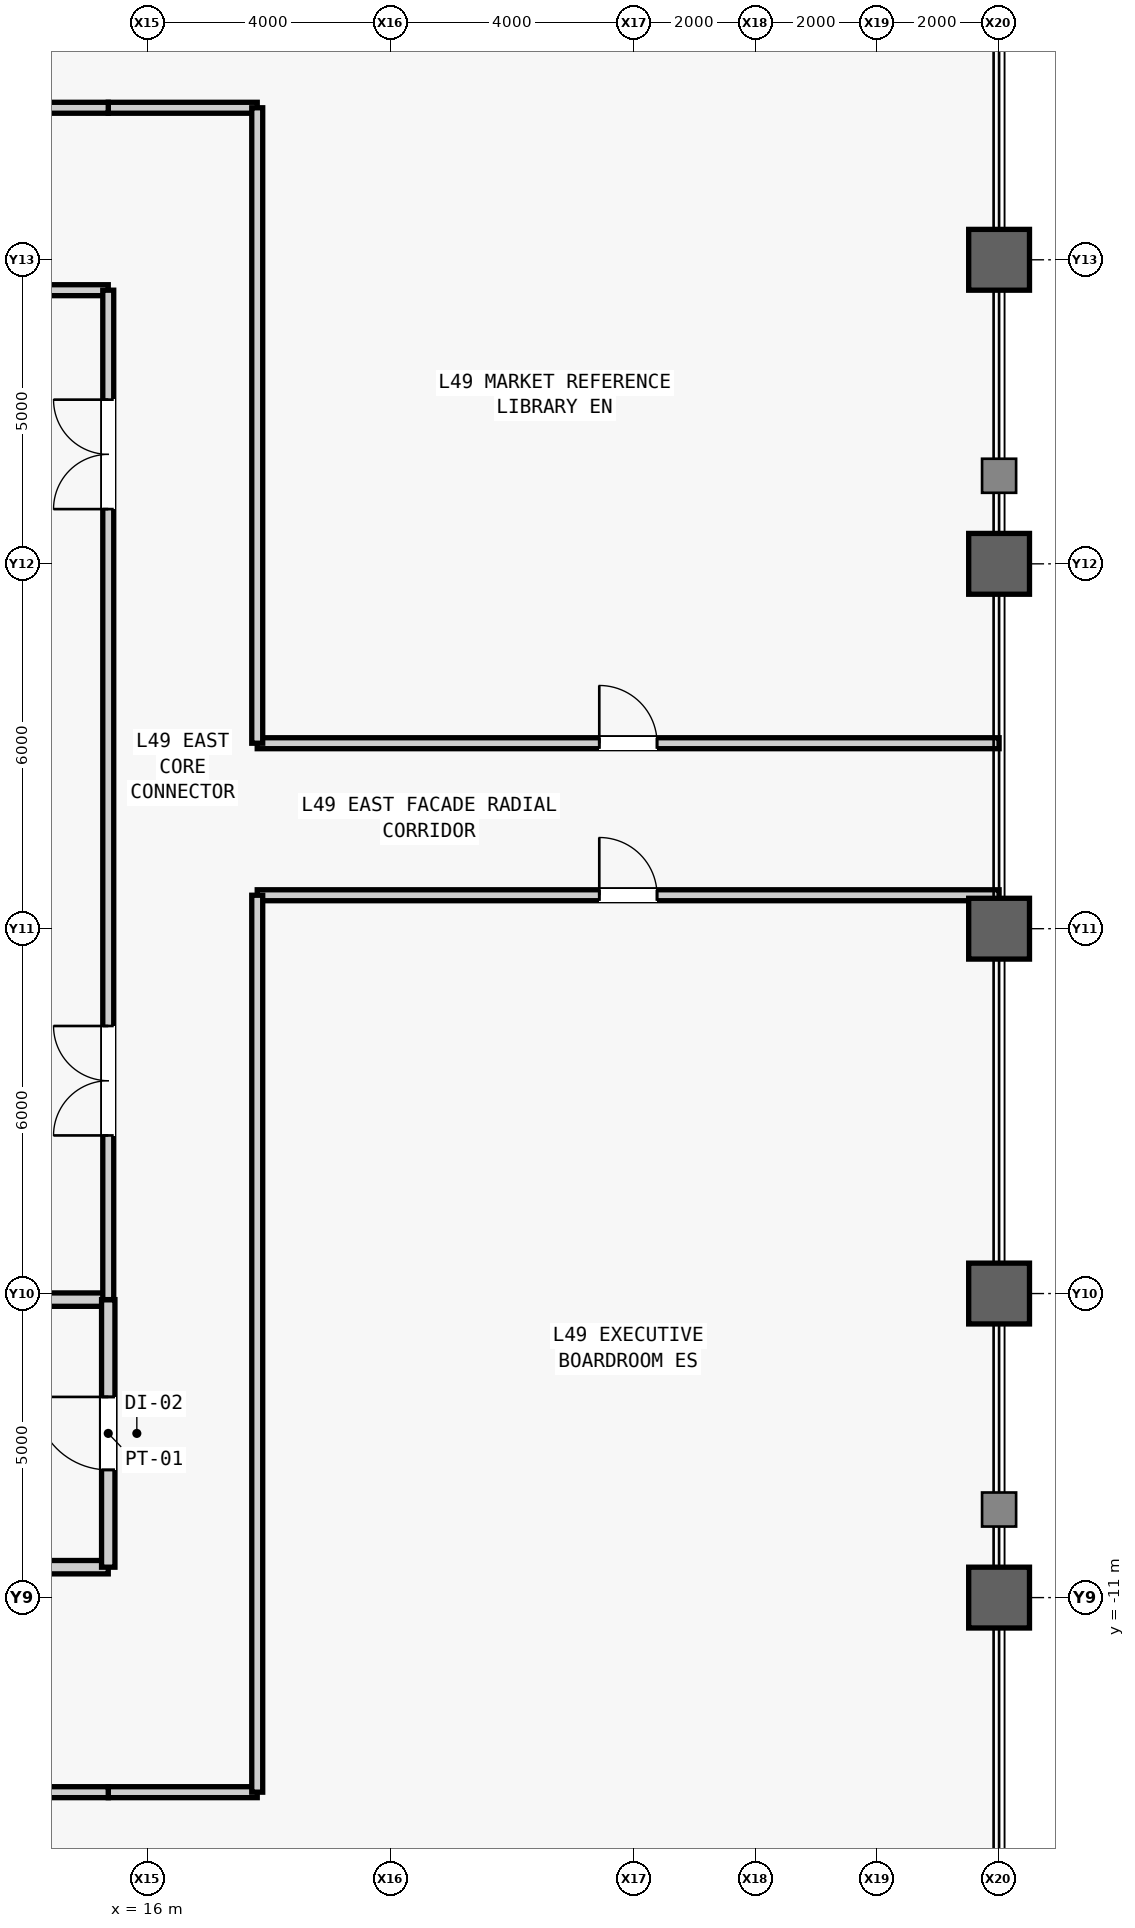
"""IFC4 building model, lengths in metres.
Left out: names, types, materials, properties, quantities, classifications, styles, units other than length and angle.
Written with IfcOpenShell. Run it as: python <this file> out.ifc"""

import sys

from ifc_helpers import new_model, si_unit, direction, frame, frame_2d, origin, origin_2d, place, context, subcontext, project, spatial, rectangle, hollow_rectangle, extrude, source, transform, mapped, element, fill, save


model = new_model("IFC4")
c1 = context("Model", 3, precision=1e-05, world=origin(), true_north=direction((0.0, 1.0)))
c2 = subcontext(c1, "Body", "Model", "MODEL_VIEW")
j1 = project(units=[si_unit("LENGTHUNIT", "METRE"), si_unit("PLANEANGLEUNIT", "RADIAN")], contexts=[c1])
p1 = place(None, origin())
s1 = spatial("IfcSite", under=j1, at=p1, CompositionType="ELEMENT")
p2 = place(p1, origin())
s2 = spatial("IfcBuilding", under=s1, at=p2, CompositionType="ELEMENT")
p3 = place(p2, frame((0.0, 0.0, 211.1)))
s3 = spatial("IfcBuildingStorey", under=s2, at=p3, CompositionType="ELEMENT", Elevation=211.1)
m1 = source(origin(), c2, "Body", "SweptSolid", [
    extrude(hollow_rectangle(XDim=1.0, YDim=1.0, WallThickness=0.055, at=origin_2d()), origin(), (0.0, 0.0, 1.0), 4.0),
])
for number, where, z_axis, x_axis in (
    (1, (30.0, -11.0, 0.0), (0.0, 0.0, 1.0), (1.0, 0.0, 0.0)),
    (2, (30.0, -6.0, 0.0), (0.0, 0.0, 1.0), (1.0, 0.0, 0.0)),
    (3, (30.0, 0.0, 0.0), (0.0, 0.0, 1.0), (1.0, 0.0, 0.0)),
    (4, (30.0, 6.0, 0.0), (0.0, 0.0, 1.0), (1.0, 0.0, 0.0)),
    (5, (30.0, 11.0, 0.0), (0.0, 0.0, 1.0), (1.0, 0.0, 0.0)),
):
    element("IfcColumn", number, at=place(p3, frame(where, z_axis=z_axis, x_axis=x_axis)), inside=s3, PredefinedType="COLUMN", context=c2, shape_type="MappedRepresentation", body=[
        mapped(m1, transform((0.0, 0.0, 0.0), scale=1.0)),
    ])
m2 = source(origin(), c2, "Body", "SweptSolid", [
    extrude(rectangle(XDim=4.05, YDim=0.22, at=frame_2d((2.025, 0.0))), origin(), (0.0, 0.0, 1.0), 3.78),
])
p4 = place(p3, frame((11.3, -10.5, 0.0), z_axis=(0.0, 0.0, 1.0), x_axis=(1.0, 0.0, 0.0)))
e6 = element("IfcWall", 6, at=p4, inside=s3, PredefinedType="PARTITIONING", context=c2, shape_type="MappedRepresentation", body=[
    mapped(m2, transform((0.0, 0.0, 0.0), scale=1.0)),
])
m3 = source(origin(), c2, "Body", "SweptSolid", [
    extrude(rectangle(XDim=4.05, YDim=0.22, at=frame_2d((2.025, 0.0))), origin(), (0.0, 0.0, 1.0), 3.085),
])
p5 = place(p3, frame((11.3, -6.1, 0.0), z_axis=(0.0, 0.0, 1.0), x_axis=(1.0, 0.0, 0.0)))
e7 = element("IfcWall", 7, at=p5, inside=s3, PredefinedType="PARTITIONING", context=c2, shape_type="MappedRepresentation", body=[
    mapped(m3, transform((0.0, 0.0, 0.0), scale=1.0)),
])
m4 = source(origin(), c2, "Body", "SweptSolid", [
    extrude(rectangle(XDim=4.4, YDim=0.22, at=frame_2d((2.2, 0.0))), origin(), (0.0, 0.0, 1.0), 3.78),
])
p6 = place(p3, frame((15.35, -10.5, 0.0), z_axis=(0.0, 0.0, 1.0), x_axis=(0.0, 1.0, 0.0)))
e8 = element("IfcWall", 8, at=p6, inside=s3, PredefinedType="PARTITIONING", context=c2, shape_type="MappedRepresentation", body=[
    mapped(m4, transform((0.0, 0.0, 0.0), scale=1.0)),
])
m5 = source(origin(), c2, "Body", "SweptSolid", [
    extrude(rectangle(XDim=1.2, YDim=2.2, at=frame_2d((0.6, 1.1))), frame((0.0, 0.12, 0.0), z_axis=(0.0, -1.0, 0.0), x_axis=(1.0, 0.0, 0.0)), (0.0, 0.0, 1.0), 0.24),
])
p7 = place(p6, frame((1.6, 0.0, 0.0)))
e9 = element("IfcOpeningElement", 9, at=p7, cuts=e8, PredefinedType="OPENING", context=c2, shape_type="MappedRepresentation", body=[
    mapped(m5, transform((0.0, 0.0, 0.0), scale=1.0)),
])
m6 = source(origin(), c2, "Body", "SweptSolid", [
    extrude(rectangle(XDim=4.05, YDim=0.18, at=frame_2d((2.025, 0.0))), origin(), (0.0, 0.0, 1.0), 3.78),
])
p8 = place(p3, frame((11.3, 10.5, 0.0), z_axis=(0.0, 0.0, 1.0), x_axis=(1.0, 0.0, 0.0)))
e10 = element("IfcWall", 10, at=p8, inside=s3, PredefinedType="PARTITIONING", context=c2, shape_type="MappedRepresentation", body=[
    mapped(m6, transform((0.0, 0.0, 0.0), scale=1.0)),
])
m7 = source(origin(), c2, "Body", "SweptSolid", [
    extrude(rectangle(XDim=16.6, YDim=0.18, at=frame_2d((8.3, 0.0))), origin(), (0.0, 0.0, 1.0), 3.78),
])
p9 = place(p3, frame((15.35, -6.1, 0.0), z_axis=(0.0, 0.0, 1.0), x_axis=(0.0, 1.0, 0.0)))
e11 = element("IfcWall", 11, at=p9, inside=s3, PredefinedType="PARTITIONING", context=c2, shape_type="MappedRepresentation", body=[
    mapped(m7, transform((0.0, 0.0, 0.0), scale=1.0)),
])
m8 = source(origin(), c2, "Body", "SweptSolid", [
    extrude(rectangle(XDim=1.8, YDim=2.25, at=frame_2d((0.9, 1.125))), frame((0.0, 0.1, 0.0), z_axis=(0.0, -1.0, 0.0), x_axis=(1.0, 0.0, 0.0)), (0.0, 0.0, 1.0), 0.2),
])
p10 = place(p9, frame((2.7, 0.0, 0.0)))
e12 = element("IfcOpeningElement", 12, at=p10, cuts=e11, PredefinedType="OPENING", context=c2, shape_type="MappedRepresentation", body=[
    mapped(m8, transform((0.0, 0.0, 0.0), scale=1.0)),
])
p11 = place(p9, frame((13.0, 0.0, 0.0)))
e13 = element("IfcOpeningElement", 13, at=p11, cuts=e11, PredefinedType="OPENING", context=c2, shape_type="MappedRepresentation", body=[
    mapped(m8, transform((0.0, 0.0, 0.0), scale=1.0)),
])
m9 = source(origin(), c2, "Body", "SweptSolid", [
    extrude(rectangle(XDim=2.45, YDim=0.18, at=frame_2d((1.225, 0.0))), origin(), (0.0, 0.0, 1.0), 3.78),
])
for number, where, z_axis, x_axis in (
    (14, (15.35, -14.2, 0.0), (0.0, 0.0, 1.0), (1.0, 0.0, 0.0)),
    (15, (15.35, 13.5, 0.0), (0.0, 0.0, 1.0), (1.0, 0.0, 0.0)),
):
    element("IfcWall", number, at=place(p3, frame(where, z_axis=z_axis, x_axis=x_axis)), inside=s3, PredefinedType="PARTITIONING", context=c2, shape_type="MappedRepresentation", body=[
        mapped(m9, transform((0.0, 0.0, 0.0), scale=1.0)),
    ])
m10 = source(origin(), c2, "Body", "SweptSolid", [
    extrude(rectangle(XDim=9.65, YDim=0.18, at=frame_2d((4.825, 0.0))), origin(), (0.0, 0.0, 1.0), 3.78),
])
p12 = place(p3, frame((5.7, -14.2, 0.0), z_axis=(0.0, 0.0, 1.0), x_axis=(1.0, 0.0, 0.0)))
e16 = element("IfcWall", 16, at=p12, inside=s3, PredefinedType="PARTITIONING", context=c2, shape_type="MappedRepresentation", body=[
    mapped(m10, transform((0.0, 0.0, 0.0), scale=1.0)),
])
m11 = source(origin(), c2, "Body", "SweptSolid", [
    extrude(rectangle(XDim=25.45, YDim=0.18, at=frame_2d((12.725, 0.0))), origin(), (0.0, 0.0, 1.0), 3.78),
])
p13 = place(p3, frame((-10.1, 13.5, 0.0), z_axis=(0.0, 0.0, 1.0), x_axis=(1.0, 0.0, 0.0)))
e17 = element("IfcWall", 17, at=p13, inside=s3, PredefinedType="PARTITIONING", context=c2, shape_type="MappedRepresentation", body=[
    mapped(m11, transform((0.0, 0.0, 0.0), scale=1.0)),
])
m12 = source(origin(), c2, "Body", "SweptSolid", [
    extrude(rectangle(XDim=12.2, YDim=0.18, at=frame_2d((6.1, 0.0))), origin(), (0.0, 0.0, 1.0), 3.78),
])
p14 = place(p3, frame((17.8, 0.55, 0.0), z_axis=(0.0, 0.0, 1.0), x_axis=(1.0, 0.0, 0.0)))
e18 = element("IfcWall", 18, at=p14, inside=s3, PredefinedType="PARTITIONING", context=c2, shape_type="MappedRepresentation", body=[
    mapped(m12, transform((0.0, 0.0, 0.0), scale=1.0)),
])
m13 = source(origin(), c2, "Body", "SweptSolid", [
    extrude(rectangle(XDim=0.95, YDim=2.15, at=frame_2d((0.475, 1.075))), frame((0.0, 0.1, 0.0), z_axis=(0.0, -1.0, 0.0), x_axis=(1.0, 0.0, 0.0)), (0.0, 0.0, 1.0), 0.2),
])
p15 = place(p14, frame((5.625, 0.0, 0.0)))
e19 = element("IfcOpeningElement", 19, at=p15, cuts=e18, PredefinedType="OPENING", context=c2, shape_type="MappedRepresentation", body=[
    mapped(m13, transform((0.0, 0.0, 0.0), scale=1.0)),
])
m14 = source(origin(), c2, "Body", "SweptSolid", [
    extrude(rectangle(XDim=14.75, YDim=0.18, at=frame_2d((7.375, 0.0))), origin(), (0.0, 0.0, 1.0), 3.78),
])
p16 = place(p3, frame((17.8, -14.2, 0.0), z_axis=(0.0, 0.0, 1.0), x_axis=(0.0, 1.0, 0.0)))
e20 = element("IfcWall", 20, at=p16, inside=s3, PredefinedType="PARTITIONING", context=c2, shape_type="MappedRepresentation", body=[
    mapped(m14, transform((0.0, 0.0, 0.0), scale=1.0)),
])
p17 = place(p3, frame((17.8, 3.05, 0.0), z_axis=(0.0, 0.0, 1.0), x_axis=(1.0, 0.0, 0.0)))
e21 = element("IfcWall", 21, at=p17, inside=s3, PredefinedType="PARTITIONING", context=c2, shape_type="MappedRepresentation", body=[
    mapped(m12, transform((0.0, 0.0, 0.0), scale=1.0)),
])
p18 = place(p17, frame((5.625, 0.0, 0.0)))
e22 = element("IfcOpeningElement", 22, at=p18, cuts=e21, PredefinedType="OPENING", context=c2, shape_type="MappedRepresentation", body=[
    mapped(m13, transform((0.0, 0.0, 0.0), scale=1.0)),
])
m15 = source(origin(), c2, "Body", "SweptSolid", [
    extrude(rectangle(XDim=10.45, YDim=0.18, at=frame_2d((5.225, 0.0))), origin(), (0.0, 0.0, 1.0), 3.78),
])
p19 = place(p3, frame((17.8, 3.05, 0.0), z_axis=(0.0, 0.0, 1.0), x_axis=(0.0, 1.0, 0.0)))
e23 = element("IfcWall", 23, at=p19, inside=s3, PredefinedType="PARTITIONING", context=c2, shape_type="MappedRepresentation", body=[
    mapped(m15, transform((0.0, 0.0, 0.0), scale=1.0)),
])
m16 = source(origin(), c2, "Body", "SweptSolid", [
    extrude(rectangle(XDim=1.2, YDim=2.2, at=frame_2d((0.6, 1.1))), frame((0.0, 0.025, 0.0), z_axis=(0.0, -1.0, 0.0), x_axis=(1.0, 0.0, 0.0)), (0.0, 0.0, 1.0), 0.05),
])
p20 = place(p7, origin())
e24 = element("IfcDoor", 24, at=p20, inside=s3, OperationType="SINGLE_SWING_RIGHT", PredefinedType="DOOR", context=c2, shape_type="MappedRepresentation", body=[
    mapped(m16, transform((0.0, 0.0, 0.0), scale=1.0)),
])
fill(e9, e24)
m17 = source(origin(), c2, "Body", "SweptSolid", [
    extrude(rectangle(XDim=1.8, YDim=2.25, at=frame_2d((0.9, 1.125))), frame((0.0, 0.025, 0.0), z_axis=(0.0, -1.0, 0.0), x_axis=(1.0, 0.0, 0.0)), (0.0, 0.0, 1.0), 0.05),
])
p21 = place(p10, origin())
e25 = element("IfcDoor", 25, at=p21, inside=s3, OperationType="SINGLE_SWING_RIGHT", PredefinedType="DOOR", context=c2, shape_type="MappedRepresentation", body=[
    mapped(m17, transform((0.0, 0.0, 0.0), scale=1.0)),
])
fill(e12, e25)
p22 = place(p11, origin())
e26 = element("IfcDoor", 26, at=p22, inside=s3, OperationType="SINGLE_SWING_LEFT", PredefinedType="DOOR", context=c2, shape_type="MappedRepresentation", body=[
    mapped(m17, transform((0.0, 0.0, 0.0), scale=1.0)),
])
fill(e13, e26)
m18 = source(origin(), c2, "Body", "SweptSolid", [
    extrude(rectangle(XDim=0.95, YDim=2.15, at=frame_2d((0.475, 1.075))), frame((0.0, 0.025, 0.0), z_axis=(0.0, -1.0, 0.0), x_axis=(1.0, 0.0, 0.0)), (0.0, 0.0, 1.0), 0.05),
])
p23 = place(p15, origin())
e27 = element("IfcDoor", 27, at=p23, inside=s3, OperationType="SINGLE_SWING_LEFT", PredefinedType="DOOR", context=c2, shape_type="MappedRepresentation", body=[
    mapped(m18, transform((0.0, 0.0, 0.0), scale=1.0)),
])
fill(e19, e27)
p24 = place(p18, origin())
e28 = element("IfcDoor", 28, at=p24, inside=s3, OperationType="SINGLE_SWING_LEFT", PredefinedType="DOOR", context=c2, shape_type="MappedRepresentation", body=[
    mapped(m18, transform((0.0, 0.0, 0.0), scale=1.0)),
])
fill(e22, e28)
save(model, sys.argv[1])
